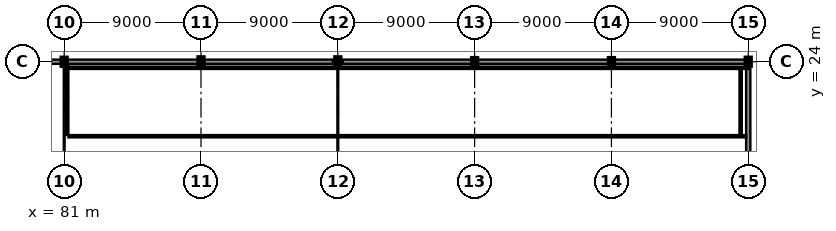
"""IFC4 building model, lengths in metres.
Left out: names, types, materials, properties, quantities, classifications, styles, units other than length and angle.
Written with IfcOpenShell. Run it as: python <this file> out.ifc"""

import sys

from ifc_helpers import new_model, si_unit, direction, frame, frame_2d, origin, origin_2d, place, context, subcontext, project, spatial, rectangle, i_section, extrude, element, fill, save


model = new_model("IFC4")
c1 = context("Model", 3, precision=1e-05, world=origin(), true_north=direction((0.0, 1.0)))
c2 = subcontext(c1, "Body", "Model", "MODEL_VIEW")
j1 = project(units=[si_unit("LENGTHUNIT", "METRE"), si_unit("PLANEANGLEUNIT", "RADIAN")], contexts=[c1])
p1 = place(None, origin())
s1 = spatial("IfcSite", under=j1, at=p1, CompositionType="ELEMENT")
p2 = place(p1, origin())
s2 = spatial("IfcBuilding", under=s1, at=p2, CompositionType="ELEMENT")
p3 = place(p2, frame((0.0, 0.0, 31.4)))
s3 = spatial("IfcBuildingStorey", under=s2, at=p3, CompositionType="ELEMENT", Elevation=31.4)
p4 = place(p3, frame((81.0, 24.0, 0.0), z_axis=(0.0, 0.0, 1.0), x_axis=(1.0, 0.0, 0.0)))
e1 = element("IfcColumn", 1, at=p4, inside=s3, PredefinedType="COLUMN", context=c2, shape_type="SweptSolid", body=[
    extrude(i_section(OverallWidth=0.3, OverallDepth=0.5, WebThickness=0.014, FlangeThickness=0.028, at=origin_2d()), origin(), (0.0, 0.0, 1.0), 4.0),
])
for number, where, z_axis, x_axis in (
    (2, (90.0, 24.0, 0.0), (0.0, 0.0, 1.0), (1.0, 0.0, 0.0)),
    (3, (99.0, 24.0, 0.0), (0.0, 0.0, 1.0), (0.0, 1.0, 0.0)),
):
    element("IfcColumn", number, at=place(p3, frame(where, z_axis=z_axis, x_axis=x_axis)), inside=s3, PredefinedType="COLUMN", context=c2, shape_type="SweptSolid", body=[
        extrude(i_section(OverallWidth=0.3, OverallDepth=0.55, WebThickness=0.015, FlangeThickness=0.029, at=origin_2d()), origin(), (0.0, 0.0, 1.0), 4.0),
    ])
for number, where, z_axis, x_axis in (
    (4, (108.0, 24.0, 0.0), (0.0, 0.0, 1.0), (1.0, 0.0, 0.0)),
    (5, (117.0, 24.0, 0.0), (0.0, 0.0, 1.0), (1.0, 0.0, 0.0)),
):
    element("IfcColumn", number, at=place(p3, frame(where, z_axis=z_axis, x_axis=x_axis)), inside=s3, PredefinedType="COLUMN", context=c2, shape_type="SweptSolid", body=[
        extrude(i_section(OverallWidth=0.3, OverallDepth=0.45, WebThickness=0.014, FlangeThickness=0.026, at=origin_2d()), origin(), (0.0, 0.0, 1.0), 4.0),
    ])
p5 = place(p3, frame((126.0, 24.0, 0.0), z_axis=(0.0, 0.0, 1.0), x_axis=(1.0, 0.0, 0.0)))
e6 = element("IfcColumn", 6, at=p5, inside=s3, PredefinedType="COLUMN", context=c2, shape_type="SweptSolid", body=[
    extrude(i_section(OverallWidth=0.3, OverallDepth=0.5, WebThickness=0.014, FlangeThickness=0.028, at=origin_2d()), origin(), (0.0, 0.0, 1.0), 4.0),
])
p6 = place(p3, frame((80.942, 24.0, 0.0), z_axis=(0.0, 0.0, 1.0), x_axis=(-1.0, 0.0, 0.0)))
e7 = element("IfcWall", 7, at=p6, inside=s3, PredefinedType="SOLIDWALL", context=c2, shape_type="SweptSolid", body=[
    extrude(rectangle(XDim=8.934, YDim=0.28, at=frame_2d((4.467, 0.0))), origin(), (0.0, 0.0, 1.0), 3.255),
])
p7 = place(p6, frame((2.03, 0.0, 1.05)))
e8 = element("IfcOpeningElement", 8, at=p7, cuts=e7, PredefinedType="OPENING", context=c2, shape_type="SweptSolid", body=[
    extrude(rectangle(XDim=1.3, YDim=1.3, at=frame_2d((0.65, 0.65))), frame((0.0, 0.155, 0.0), z_axis=(0.0, -1.0, 0.0), x_axis=(1.0, 0.0, 0.0)), (0.0, 0.0, 1.0), 0.31),
])
p8 = place(p6, frame((5.604, 0.0, 1.05)))
e9 = element("IfcOpeningElement", 9, at=p8, cuts=e7, PredefinedType="OPENING", context=c2, shape_type="SweptSolid", body=[
    extrude(rectangle(XDim=1.3, YDim=1.3, at=frame_2d((0.65, 0.65))), frame((0.0, 0.155, 0.0), z_axis=(0.0, -1.0, 0.0), x_axis=(1.0, 0.0, 0.0)), (0.0, 0.0, 1.0), 0.31),
])
p9 = place(p3, frame((98.677, 24.0, 0.0), z_axis=(0.0, 0.0, 1.0), x_axis=(-1.0, 0.0, 0.0)))
e10 = element("IfcWall", 10, at=p9, inside=s3, PredefinedType="SOLIDWALL", context=c2, shape_type="SweptSolid", body=[
    extrude(rectangle(XDim=8.669, YDim=0.28, at=frame_2d((4.334, 0.0))), origin(), (0.0, 0.0, 1.0), 3.255),
])
p10 = place(p9, frame((1.951, 0.0, 1.05)))
e11 = element("IfcOpeningElement", 11, at=p10, cuts=e10, PredefinedType="OPENING", context=c2, shape_type="SweptSolid", body=[
    extrude(rectangle(XDim=1.3, YDim=1.3, at=frame_2d((0.65, 0.65))), frame((0.0, 0.155, 0.0), z_axis=(0.0, -1.0, 0.0), x_axis=(1.0, 0.0, 0.0)), (0.0, 0.0, 1.0), 0.31),
])
p11 = place(p9, frame((5.418, 0.0, 1.05)))
e12 = element("IfcOpeningElement", 12, at=p11, cuts=e10, PredefinedType="OPENING", context=c2, shape_type="SweptSolid", body=[
    extrude(rectangle(XDim=1.3, YDim=1.3, at=frame_2d((0.65, 0.65))), frame((0.0, 0.155, 0.0), z_axis=(0.0, -1.0, 0.0), x_axis=(1.0, 0.0, 0.0)), (0.0, 0.0, 1.0), 0.31),
])
p12 = place(p3, frame((89.992, 24.0, 0.0), z_axis=(0.0, 0.0, 1.0), x_axis=(-1.0, 0.0, 0.0)))
e13 = element("IfcWall", 13, at=p12, inside=s3, PredefinedType="SOLIDWALL", context=c2, shape_type="SweptSolid", body=[
    extrude(rectangle(XDim=8.934, YDim=0.28, at=frame_2d((4.467, 0.0))), origin(), (0.0, 0.0, 1.0), 3.255),
])
p13 = place(p12, frame((2.03, 0.0, 1.05)))
e14 = element("IfcOpeningElement", 14, at=p13, cuts=e13, PredefinedType="OPENING", context=c2, shape_type="SweptSolid", body=[
    extrude(rectangle(XDim=1.3, YDim=1.3, at=frame_2d((0.65, 0.65))), frame((0.0, 0.155, 0.0), z_axis=(0.0, -1.0, 0.0), x_axis=(1.0, 0.0, 0.0)), (0.0, 0.0, 1.0), 0.31),
])
p14 = place(p12, frame((5.604, 0.0, 1.05)))
e15 = element("IfcOpeningElement", 15, at=p14, cuts=e13, PredefinedType="OPENING", context=c2, shape_type="SweptSolid", body=[
    extrude(rectangle(XDim=1.3, YDim=1.3, at=frame_2d((0.65, 0.65))), frame((0.0, 0.155, 0.0), z_axis=(0.0, -1.0, 0.0), x_axis=(1.0, 0.0, 0.0)), (0.0, 0.0, 1.0), 0.31),
])
p15 = place(p3, frame((126.0, 12.128, 0.0), z_axis=(0.0, 0.0, 1.0), x_axis=(0.0, 1.0, 0.0)))
e16 = element("IfcWall", 16, at=p15, inside=s3, PredefinedType="SOLIDWALL", context=c2, shape_type="SweptSolid", body=[
    extrude(rectangle(XDim=11.624, YDim=0.28, at=frame_2d((5.812, 0.0))), origin(), (0.0, 0.0, 1.0), 3.245),
])
p16 = place(p15, frame((2.032, 0.0, 1.05)))
e17 = element("IfcOpeningElement", 17, at=p16, cuts=e16, PredefinedType="OPENING", context=c2, shape_type="SweptSolid", body=[
    extrude(rectangle(XDim=1.3, YDim=1.3, at=frame_2d((0.65, 0.65))), frame((0.0, 0.155, 0.0), z_axis=(0.0, -1.0, 0.0), x_axis=(1.0, 0.0, 0.0)), (0.0, 0.0, 1.0), 0.31),
])
p17 = place(p15, frame((7.487, 0.0, 1.05)))
e18 = element("IfcOpeningElement", 18, at=p17, cuts=e16, PredefinedType="OPENING", context=c2, shape_type="SweptSolid", body=[
    extrude(rectangle(XDim=1.3, YDim=1.3, at=frame_2d((0.65, 0.65))), frame((0.0, 0.155, 0.0), z_axis=(0.0, -1.0, 0.0), x_axis=(1.0, 0.0, 0.0)), (0.0, 0.0, 1.0), 0.31),
])
p18 = place(p3, frame((125.992, 24.0, 0.0), z_axis=(0.0, 0.0, 1.0), x_axis=(-1.0, 0.0, 0.0)))
e19 = element("IfcWall", 19, at=p18, inside=s3, PredefinedType="SOLIDWALL", context=c2, shape_type="SweptSolid", body=[
    extrude(rectangle(XDim=8.984, YDim=0.28, at=frame_2d((4.492, 0.0))), origin(), (0.0, 0.0, 1.0), 3.255),
])
p19 = place(p18, frame((2.045, 0.0, 1.05)))
e20 = element("IfcOpeningElement", 20, at=p19, cuts=e19, PredefinedType="OPENING", context=c2, shape_type="SweptSolid", body=[
    extrude(rectangle(XDim=1.3, YDim=1.3, at=frame_2d((0.65, 0.65))), frame((0.0, 0.155, 0.0), z_axis=(0.0, -1.0, 0.0), x_axis=(1.0, 0.0, 0.0)), (0.0, 0.0, 1.0), 0.31),
])
p20 = place(p18, frame((5.639, 0.0, 1.05)))
e21 = element("IfcOpeningElement", 21, at=p20, cuts=e19, PredefinedType="OPENING", context=c2, shape_type="SweptSolid", body=[
    extrude(rectangle(XDim=1.3, YDim=1.3, at=frame_2d((0.65, 0.65))), frame((0.0, 0.155, 0.0), z_axis=(0.0, -1.0, 0.0), x_axis=(1.0, 0.0, 0.0)), (0.0, 0.0, 1.0), 0.31),
])
p21 = place(p3, frame((116.992, 24.0, 0.0), z_axis=(0.0, 0.0, 1.0), x_axis=(-1.0, 0.0, 0.0)))
e22 = element("IfcWall", 22, at=p21, inside=s3, PredefinedType="SOLIDWALL", context=c2, shape_type="SweptSolid", body=[
    extrude(rectangle(XDim=8.984, YDim=0.28, at=frame_2d((4.492, 0.0))), origin(), (0.0, 0.0, 1.0), 3.255),
])
p22 = place(p21, frame((2.045, 0.0, 1.05)))
e23 = element("IfcOpeningElement", 23, at=p22, cuts=e22, PredefinedType="OPENING", context=c2, shape_type="SweptSolid", body=[
    extrude(rectangle(XDim=1.3, YDim=1.3, at=frame_2d((0.65, 0.65))), frame((0.0, 0.155, 0.0), z_axis=(0.0, -1.0, 0.0), x_axis=(1.0, 0.0, 0.0)), (0.0, 0.0, 1.0), 0.31),
])
p23 = place(p21, frame((5.639, 0.0, 1.05)))
e24 = element("IfcOpeningElement", 24, at=p23, cuts=e22, PredefinedType="OPENING", context=c2, shape_type="SweptSolid", body=[
    extrude(rectangle(XDim=1.3, YDim=1.3, at=frame_2d((0.65, 0.65))), frame((0.0, 0.155, 0.0), z_axis=(0.0, -1.0, 0.0), x_axis=(1.0, 0.0, 0.0)), (0.0, 0.0, 1.0), 0.31),
])
p24 = place(p3, frame((107.992, 24.0, 0.0), z_axis=(0.0, 0.0, 1.0), x_axis=(-1.0, 0.0, 0.0)))
e25 = element("IfcWall", 25, at=p24, inside=s3, PredefinedType="SOLIDWALL", context=c2, shape_type="SweptSolid", body=[
    extrude(rectangle(XDim=8.669, YDim=0.28, at=frame_2d((4.334, 0.0))), origin(), (0.0, 0.0, 1.0), 3.255),
])
p25 = place(p24, frame((1.951, 0.0, 1.05)))
e26 = element("IfcOpeningElement", 26, at=p25, cuts=e25, PredefinedType="OPENING", context=c2, shape_type="SweptSolid", body=[
    extrude(rectangle(XDim=1.3, YDim=1.3, at=frame_2d((0.65, 0.65))), frame((0.0, 0.155, 0.0), z_axis=(0.0, -1.0, 0.0), x_axis=(1.0, 0.0, 0.0)), (0.0, 0.0, 1.0), 0.31),
])
p26 = place(p24, frame((5.418, 0.0, 1.05)))
e27 = element("IfcOpeningElement", 27, at=p26, cuts=e25, PredefinedType="OPENING", context=c2, shape_type="SweptSolid", body=[
    extrude(rectangle(XDim=1.3, YDim=1.3, at=frame_2d((0.65, 0.65))), frame((0.0, 0.155, 0.0), z_axis=(0.0, -1.0, 0.0), x_axis=(1.0, 0.0, 0.0)), (0.0, 0.0, 1.0), 0.31),
])
p27 = place(p3, frame((125.865, 19.1, 0.0), z_axis=(0.0, 0.0, 1.0), x_axis=(-1.0, 0.0, 0.0)))
e28 = element("IfcWall", 28, at=p27, inside=s3, PredefinedType="PARTITIONING", context=c2, shape_type="SweptSolid", body=[
    extrude(rectangle(XDim=44.585, YDim=0.15, at=frame_2d((22.292, 0.0))), origin(), (0.0, 0.0, 1.0), 3.64),
])
p28 = place(p27, frame((21.768, 0.0, 0.0)))
e29 = element("IfcOpeningElement", 29, at=p28, cuts=e28, PredefinedType="OPENING", context=c2, shape_type="SweptSolid", body=[
    extrude(rectangle(XDim=1.05, YDim=2.25, at=frame_2d((0.525, 1.125))), frame((0.0, 0.09, 0.0), z_axis=(0.0, -1.0, 0.0), x_axis=(1.0, 0.0, 0.0)), (0.0, 0.0, 1.0), 0.18),
])
p29 = place(p3, frame((81.2, 19.18, 0.0), z_axis=(0.0, 0.0, 1.0), x_axis=(0.0, 1.0, 0.0)))
e30 = element("IfcWall", 30, at=p29, inside=s3, PredefinedType="PARTITIONING", context=c2, shape_type="SweptSolid", body=[
    extrude(rectangle(XDim=4.572, YDim=0.15, at=frame_2d((2.286, 0.0))), origin(), (0.0, 0.0, 1.0), 3.315),
])
p30 = place(p3, frame((81.208, 23.6, 0.0), z_axis=(0.0, 0.0, 1.0), x_axis=(1.0, 0.0, 0.0)))
e31 = element("IfcWall", 31, at=p30, inside=s3, PredefinedType="PARTITIONING", context=c2, shape_type="SweptSolid", body=[
    extrude(rectangle(XDim=44.784, YDim=0.15, at=frame_2d((22.392, 0.0))), origin(), (0.0, 0.0, 1.0), 3.64),
])
p31 = place(p3, frame((125.5, 23.53, 0.0), z_axis=(0.0, 0.0, 1.0), x_axis=(0.0, -1.0, 0.0)))
e32 = element("IfcWall", 32, at=p31, inside=s3, PredefinedType="PARTITIONING", context=c2, shape_type="SweptSolid", body=[
    extrude(rectangle(XDim=4.36, YDim=0.15, at=frame_2d((2.18, 0.0))), origin(), (0.0, 0.0, 1.0), 3.64),
])
p32 = place(p10, origin())
e33 = element("IfcWindow", 33, at=p32, inside=s3, PartitioningType="SINGLE_PANEL", PredefinedType="WINDOW", context=c2, shape_type="SweptSolid", body=[
    extrude(rectangle(XDim=1.3, YDim=1.3, at=frame_2d((0.65, 0.65))), frame((0.0, 0.03, 0.0), z_axis=(0.0, -1.0, 0.0), x_axis=(1.0, 0.0, 0.0)), (0.0, 0.0, 1.0), 0.06),
])
fill(e11, e33)
p33 = place(p11, origin())
e34 = element("IfcWindow", 34, at=p33, inside=s3, PartitioningType="SINGLE_PANEL", PredefinedType="WINDOW", context=c2, shape_type="SweptSolid", body=[
    extrude(rectangle(XDim=1.3, YDim=1.3, at=frame_2d((0.65, 0.65))), frame((0.0, 0.03, 0.0), z_axis=(0.0, -1.0, 0.0), x_axis=(1.0, 0.0, 0.0)), (0.0, 0.0, 1.0), 0.06),
])
fill(e12, e34)
p34 = place(p13, origin())
e35 = element("IfcWindow", 35, at=p34, inside=s3, PartitioningType="SINGLE_PANEL", PredefinedType="WINDOW", context=c2, shape_type="SweptSolid", body=[
    extrude(rectangle(XDim=1.3, YDim=1.3, at=frame_2d((0.65, 0.65))), frame((0.0, 0.03, 0.0), z_axis=(0.0, -1.0, 0.0), x_axis=(1.0, 0.0, 0.0)), (0.0, 0.0, 1.0), 0.06),
])
fill(e14, e35)
p35 = place(p14, origin())
e36 = element("IfcWindow", 36, at=p35, inside=s3, PartitioningType="SINGLE_PANEL", PredefinedType="WINDOW", context=c2, shape_type="SweptSolid", body=[
    extrude(rectangle(XDim=1.3, YDim=1.3, at=frame_2d((0.65, 0.65))), frame((0.0, 0.03, 0.0), z_axis=(0.0, -1.0, 0.0), x_axis=(1.0, 0.0, 0.0)), (0.0, 0.0, 1.0), 0.06),
])
fill(e15, e36)
p36 = place(p17, origin())
e37 = element("IfcWindow", 37, at=p36, inside=s3, PartitioningType="SINGLE_PANEL", PredefinedType="WINDOW", context=c2, shape_type="SweptSolid", body=[
    extrude(rectangle(XDim=1.3, YDim=1.3, at=frame_2d((0.65, 0.65))), frame((0.0, 0.03, 0.0), z_axis=(0.0, -1.0, 0.0), x_axis=(1.0, 0.0, 0.0)), (0.0, 0.0, 1.0), 0.06),
])
fill(e18, e37)
p37 = place(p19, origin())
e38 = element("IfcWindow", 38, at=p37, inside=s3, PartitioningType="SINGLE_PANEL", PredefinedType="WINDOW", context=c2, shape_type="SweptSolid", body=[
    extrude(rectangle(XDim=1.3, YDim=1.3, at=frame_2d((0.65, 0.65))), frame((0.0, 0.03, 0.0), z_axis=(0.0, -1.0, 0.0), x_axis=(1.0, 0.0, 0.0)), (0.0, 0.0, 1.0), 0.06),
])
fill(e20, e38)
p38 = place(p20, origin())
e39 = element("IfcWindow", 39, at=p38, inside=s3, PartitioningType="SINGLE_PANEL", PredefinedType="WINDOW", context=c2, shape_type="SweptSolid", body=[
    extrude(rectangle(XDim=1.3, YDim=1.3, at=frame_2d((0.65, 0.65))), frame((0.0, 0.03, 0.0), z_axis=(0.0, -1.0, 0.0), x_axis=(1.0, 0.0, 0.0)), (0.0, 0.0, 1.0), 0.06),
])
fill(e21, e39)
p39 = place(p22, origin())
e40 = element("IfcWindow", 40, at=p39, inside=s3, PartitioningType="SINGLE_PANEL", PredefinedType="WINDOW", context=c2, shape_type="SweptSolid", body=[
    extrude(rectangle(XDim=1.3, YDim=1.3, at=frame_2d((0.65, 0.65))), frame((0.0, 0.03, 0.0), z_axis=(0.0, -1.0, 0.0), x_axis=(1.0, 0.0, 0.0)), (0.0, 0.0, 1.0), 0.06),
])
fill(e23, e40)
p40 = place(p23, origin())
e41 = element("IfcWindow", 41, at=p40, inside=s3, PartitioningType="SINGLE_PANEL", PredefinedType="WINDOW", context=c2, shape_type="SweptSolid", body=[
    extrude(rectangle(XDim=1.3, YDim=1.3, at=frame_2d((0.65, 0.65))), frame((0.0, 0.03, 0.0), z_axis=(0.0, -1.0, 0.0), x_axis=(1.0, 0.0, 0.0)), (0.0, 0.0, 1.0), 0.06),
])
fill(e24, e41)
p41 = place(p25, origin())
e42 = element("IfcWindow", 42, at=p41, inside=s3, PartitioningType="SINGLE_PANEL", PredefinedType="WINDOW", context=c2, shape_type="SweptSolid", body=[
    extrude(rectangle(XDim=1.3, YDim=1.3, at=frame_2d((0.65, 0.65))), frame((0.0, 0.03, 0.0), z_axis=(0.0, -1.0, 0.0), x_axis=(1.0, 0.0, 0.0)), (0.0, 0.0, 1.0), 0.06),
])
fill(e26, e42)
p42 = place(p26, origin())
e43 = element("IfcWindow", 43, at=p42, inside=s3, PartitioningType="SINGLE_PANEL", PredefinedType="WINDOW", context=c2, shape_type="SweptSolid", body=[
    extrude(rectangle(XDim=1.3, YDim=1.3, at=frame_2d((0.65, 0.65))), frame((0.0, 0.03, 0.0), z_axis=(0.0, -1.0, 0.0), x_axis=(1.0, 0.0, 0.0)), (0.0, 0.0, 1.0), 0.06),
])
fill(e27, e43)
p43 = place(p28, origin())
e44 = element("IfcDoor", 44, at=p43, inside=s3, OperationType="SINGLE_SWING_LEFT", PredefinedType="DOOR", context=c2, shape_type="SweptSolid", body=[
    extrude(rectangle(XDim=1.05, YDim=2.25, at=frame_2d((0.525, 1.125))), frame((0.0, 0.025, 0.0), z_axis=(0.0, -1.0, 0.0), x_axis=(1.0, 0.0, 0.0)), (0.0, 0.0, 1.0), 0.05),
])
fill(e29, e44)
save(model, sys.argv[1])
